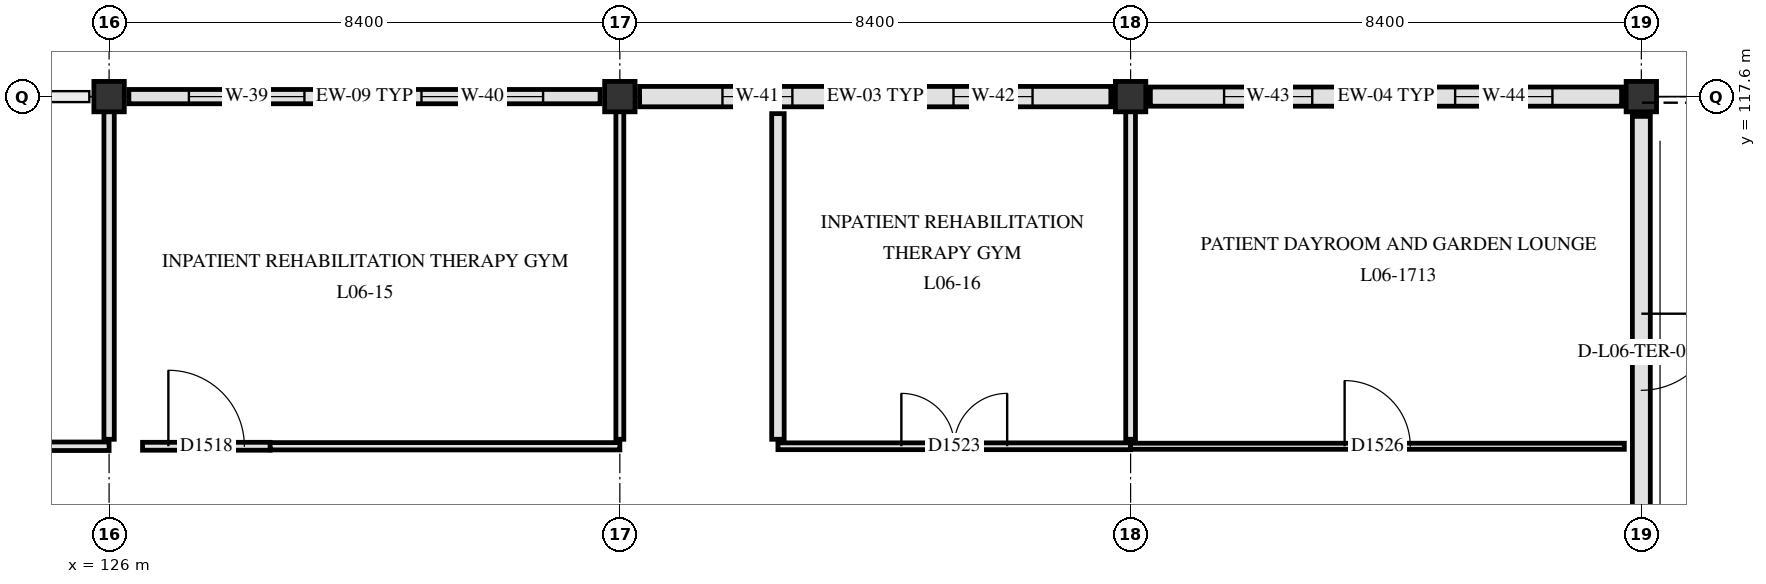
"""IFC4 building model, lengths in metres.
Left out: names, types, materials, properties, quantities, classifications, styles, units other than length and angle.
Written with IfcOpenShell. Run it as: python <this file> out.ifc"""

import sys

from ifc_helpers import new_model, si_unit, direction, frame, frame_2d, origin, origin_2d, place, context, subcontext, project, spatial, rectangle, extrude, element, fill, save


model = new_model("IFC4")
c1 = context("Model", 3, precision=1e-05, world=origin(), true_north=direction((0.0, 1.0)))
c2 = subcontext(c1, "Body", "Model", "MODEL_VIEW")
j1 = project(units=[si_unit("LENGTHUNIT", "METRE"), si_unit("PLANEANGLEUNIT", "RADIAN")], contexts=[c1])
p1 = place(None, origin())
s1 = spatial("IfcSite", under=j1, at=p1, CompositionType="ELEMENT")
p2 = place(p1, origin())
s2 = spatial("IfcBuilding", under=s1, at=p2, CompositionType="ELEMENT")
p3 = place(p2, frame((0.0, 0.0, 26.4)))
s3 = spatial("IfcBuildingStorey", under=s2, at=p3, CompositionType="ELEMENT", Elevation=26.4)
for number, where, z_axis, x_axis in (
    (1, (126.0, 117.6, 0.0), (0.0, 0.0, 1.0), (1.0, 0.0, 0.0)),
    (2, (134.4, 117.6, 0.0), (0.0, 0.0, 1.0), (1.0, 0.0, 0.0)),
    (3, (142.8, 117.6, 0.0), (0.0, 0.0, 1.0), (1.0, 0.0, 0.0)),
    (4, (151.2, 117.6, 0.0), (0.0, 0.0, 1.0), (1.0, 0.0, 0.0)),
):
    element("IfcColumn", number, at=place(p3, frame(where, z_axis=z_axis, x_axis=x_axis)), inside=s3, PredefinedType="COLUMN", context=c2, shape_type="SweptSolid", body=[
        extrude(rectangle(XDim=0.5, YDim=0.5, at=origin_2d()), origin(), (0.0, 0.0, 1.0), 3.9),
    ])
p4 = place(p3, frame((126.325, 117.6, 0.0), z_axis=(0.0, 0.0, 1.0), x_axis=(1.0, 0.0, 0.0)))
e5 = element("IfcWall", 5, at=p4, inside=s3, PredefinedType="SOLIDWALL", context=c2, shape_type="SweptSolid", body=[
    extrude(rectangle(XDim=7.75, YDim=0.235, at=frame_2d((3.875, 0.0))), origin(), (0.0, 0.0, 1.0), 3.26),
])
p5 = place(p4, frame((0.988, 0.0, 0.85)))
e6 = element("IfcOpeningElement", 6, at=p5, cuts=e5, PredefinedType="OPENING", context=c2, shape_type="SweptSolid", body=[
    extrude(rectangle(XDim=1.9, YDim=1.66, at=frame_2d((0.95, 0.83))), frame((0.0, 0.127, 0.0), z_axis=(0.0, -1.0, 0.0), x_axis=(1.0, 0.0, 0.0)), (0.0, 0.0, 1.0), 0.255),
])
p6 = place(p4, frame((4.812, 0.0, 0.85)))
e7 = element("IfcOpeningElement", 7, at=p6, cuts=e5, PredefinedType="OPENING", context=c2, shape_type="SweptSolid", body=[
    extrude(rectangle(XDim=2.0, YDim=1.66, at=frame_2d((1.0, 0.83))), frame((0.0, 0.127, 0.0), z_axis=(0.0, -1.0, 0.0), x_axis=(1.0, 0.0, 0.0)), (0.0, 0.0, 1.0), 0.255),
])
p7 = place(p3, frame((134.725, 117.6, 0.0), z_axis=(0.0, 0.0, 1.0), x_axis=(1.0, 0.0, 0.0)))
e8 = element("IfcWall", 8, at=p7, inside=s3, PredefinedType="SOLIDWALL", context=c2, shape_type="SweptSolid", body=[
    extrude(rectangle(XDim=7.75, YDim=0.335, at=frame_2d((3.875, 0.0))), origin(), (0.0, 0.0, 1.0), 3.26),
])
p8 = place(p7, frame((1.363, 0.0, 0.85)))
e9 = element("IfcOpeningElement", 9, at=p8, cuts=e8, PredefinedType="OPENING", context=c2, shape_type="SweptSolid", body=[
    extrude(rectangle(XDim=1.15, YDim=1.78, at=frame_2d((0.575, 0.89))), frame((0.0, 0.177, 0.0), z_axis=(0.0, -1.0, 0.0), x_axis=(1.0, 0.0, 0.0)), (0.0, 0.0, 1.0), 0.355),
])
p9 = place(p7, frame((5.163, 0.0, 0.85)))
e10 = element("IfcOpeningElement", 10, at=p9, cuts=e8, PredefinedType="OPENING", context=c2, shape_type="SweptSolid", body=[
    extrude(rectangle(XDim=1.3, YDim=1.78, at=frame_2d((0.65, 0.89))), frame((0.0, 0.177, 0.0), z_axis=(0.0, -1.0, 0.0), x_axis=(1.0, 0.0, 0.0)), (0.0, 0.0, 1.0), 0.355),
])
p10 = place(p3, frame((143.125, 117.6, 0.0), z_axis=(0.0, 0.0, 1.0), x_axis=(1.0, 0.0, 0.0)))
e11 = element("IfcWall", 11, at=p10, inside=s3, PredefinedType="SOLIDWALL", context=c2, shape_type="SweptSolid", body=[
    extrude(rectangle(XDim=7.75, YDim=0.315, at=frame_2d((3.875, 0.0))), origin(), (0.0, 0.0, 1.0), 3.26),
])
p11 = place(p10, frame((1.212, 0.0, 0.85)))
e12 = element("IfcOpeningElement", 12, at=p11, cuts=e11, PredefinedType="OPENING", context=c2, shape_type="SweptSolid", body=[
    extrude(rectangle(XDim=1.45, YDim=1.78, at=frame_2d((0.725, 0.89))), frame((0.0, 0.167, 0.0), z_axis=(0.0, -1.0, 0.0), x_axis=(1.0, 0.0, 0.0)), (0.0, 0.0, 1.0), 0.335),
])
p12 = place(p10, frame((5.012, 0.0, 0.85)))
e13 = element("IfcOpeningElement", 13, at=p12, cuts=e11, PredefinedType="OPENING", context=c2, shape_type="SweptSolid", body=[
    extrude(rectangle(XDim=1.6, YDim=1.78, at=frame_2d((0.8, 0.89))), frame((0.0, 0.167, 0.0), z_axis=(0.0, -1.0, 0.0), x_axis=(1.0, 0.0, 0.0)), (0.0, 0.0, 1.0), 0.335),
])
p13 = place(p3, frame((151.2, 117.275, 0.0), z_axis=(0.0, 0.0, 1.0), x_axis=(0.0, -1.0, 0.0)))
e14 = element("IfcWall", 14, at=p13, inside=s3, PredefinedType="SOLIDWALL", context=c2, shape_type="SweptSolid", body=[
    extrude(rectangle(XDim=7.75, YDim=0.295, at=frame_2d((3.875, 0.0))), origin(), (0.0, 0.0, 1.0), 3.24),
])
p14 = place(p13, frame((3.245, 0.0, 0.0)))
e15 = element("IfcOpeningElement", 15, at=p14, cuts=e14, PredefinedType="OPENING", context=c2, shape_type="SweptSolid", body=[
    extrude(rectangle(XDim=1.26, YDim=2.15, at=frame_2d((0.63, 1.075))), frame((0.0, 0.157, 0.0), z_axis=(0.0, -1.0, 0.0), x_axis=(1.0, 0.0, 0.0)), (0.0, 0.0, 1.0), 0.315),
])
p15 = place(p3, frame((121.5, 111.85, 0.0), z_axis=(0.0, 0.0, 1.0), x_axis=(1.0, 0.0, 0.0)))
e16 = element("IfcWall", 16, at=p15, inside=s3, PredefinedType="PARTITIONING", context=c2, shape_type="SweptSolid", body=[
    extrude(rectangle(XDim=4.5, YDim=0.14, at=frame_2d((2.25, 0.0))), origin(), (0.0, 0.0, 1.0), 3.11),
])
p16 = place(p15, frame((1.3, 0.0, 0.0)))
e17 = element("IfcOpeningElement", 17, at=p16, cuts=e16, PredefinedType="OPENING", context=c2, shape_type="SweptSolid", body=[
    extrude(rectangle(XDim=1.9, YDim=2.3, at=frame_2d((0.95, 1.15))), frame((0.0, 0.08, 0.0), z_axis=(0.0, -1.0, 0.0), x_axis=(1.0, 0.0, 0.0)), (0.0, 0.0, 1.0), 0.16),
])
p17 = place(p3, frame((126.55, 111.85, 0.0), z_axis=(0.0, 0.0, 1.0), x_axis=(1.0, 0.0, 0.0)))
e18 = element("IfcWall", 18, at=p17, inside=s3, PredefinedType="PARTITIONING", context=c2, shape_type="SweptSolid", body=[
    extrude(rectangle(XDim=2.1, YDim=0.13, at=frame_2d((1.05, 0.0))), origin(), (0.0, 0.0, 1.0), 3.24),
])
p18 = place(p17, frame((0.425, 0.0, 0.0)))
e19 = element("IfcOpeningElement", 19, at=p18, cuts=e18, PredefinedType="OPENING", context=c2, shape_type="SweptSolid", body=[
    extrude(rectangle(XDim=1.25, YDim=2.2, at=frame_2d((0.625, 1.1))), frame((0.0, 0.075, 0.0), z_axis=(0.0, -1.0, 0.0), x_axis=(1.0, 0.0, 0.0)), (0.0, 0.0, 1.0), 0.15),
])
p19 = place(p3, frame((128.65, 111.85, 0.0), z_axis=(0.0, 0.0, 1.0), x_axis=(1.0, 0.0, 0.0)))
e20 = element("IfcWall", 20, at=p19, inside=s3, PredefinedType="PARTITIONING", context=c2, shape_type="SweptSolid", body=[
    extrude(rectangle(XDim=5.75, YDim=0.12, at=frame_2d((2.875, 0.0))), origin(), (0.0, 0.0, 1.0), 3.11),
])
p20 = place(p3, frame((137.0, 111.85, 0.0), z_axis=(0.0, 0.0, 1.0), x_axis=(1.0, 0.0, 0.0)))
e21 = element("IfcWall", 21, at=p20, inside=s3, PredefinedType="PARTITIONING", context=c2, shape_type="SweptSolid", body=[
    extrude(rectangle(XDim=5.8, YDim=0.112, at=frame_2d((2.9, 0.0))), origin(), (0.0, 0.0, 1.0), 3.11),
])
p21 = place(p20, frame((2.03, 0.0, 0.0)))
e22 = element("IfcOpeningElement", 22, at=p21, cuts=e21, PredefinedType="OPENING", context=c2, shape_type="SweptSolid", body=[
    extrude(rectangle(XDim=1.74, YDim=2.24, at=frame_2d((0.87, 1.12))), frame((0.0, 0.066, 0.0), z_axis=(0.0, -1.0, 0.0), x_axis=(1.0, 0.0, 0.0)), (0.0, 0.0, 1.0), 0.132),
])
p22 = place(p3, frame((142.8, 111.85, 0.0), z_axis=(0.0, 0.0, 1.0), x_axis=(1.0, 0.0, 0.0)))
e23 = element("IfcWall", 23, at=p22, inside=s3, PredefinedType="PARTITIONING", context=c2, shape_type="SweptSolid", body=[
    extrude(rectangle(XDim=8.12, YDim=0.1, at=frame_2d((4.06, 0.0))), origin(), (0.0, 0.0, 1.0), 3.11),
])
p23 = place(p22, frame((3.52, 0.0, 0.0)))
e24 = element("IfcOpeningElement", 24, at=p23, cuts=e23, PredefinedType="OPENING", context=c2, shape_type="SweptSolid", body=[
    extrude(rectangle(XDim=1.08, YDim=2.12, at=frame_2d((0.54, 1.06))), frame((0.0, 0.06, 0.0), z_axis=(0.0, -1.0, 0.0), x_axis=(1.0, 0.0, 0.0)), (0.0, 0.0, 1.0), 0.12),
])
p24 = place(p3, frame((126.0, 111.965, 0.0), z_axis=(0.0, 0.0, 1.0), x_axis=(0.0, 1.0, 0.0)))
e25 = element("IfcWall", 25, at=p24, inside=s3, PredefinedType="PARTITIONING", context=c2, shape_type="SweptSolid", body=[
    extrude(rectangle(XDim=5.39, YDim=0.17, at=frame_2d((2.695, 0.0))), origin(), (0.0, 0.0, 1.0), 3.11),
])
p25 = place(p3, frame((134.4, 111.965, 0.0), z_axis=(0.0, 0.0, 1.0), x_axis=(0.0, 1.0, 0.0)))
e26 = element("IfcWall", 26, at=p25, inside=s3, PredefinedType="PARTITIONING", context=c2, shape_type="SweptSolid", body=[
    extrude(rectangle(XDim=5.39, YDim=0.13, at=frame_2d((2.695, 0.0))), origin(), (0.0, 0.0, 1.0), 3.11),
])
p26 = place(p3, frame((137.0, 111.965, 0.0), z_axis=(0.0, 0.0, 1.0), x_axis=(0.0, 1.0, 0.0)))
e27 = element("IfcWall", 27, at=p26, inside=s3, PredefinedType="PARTITIONING", context=c2, shape_type="SweptSolid", body=[
    extrude(rectangle(XDim=5.355, YDim=0.205, at=frame_2d((2.677, 0.0))), origin(), (0.0, 0.0, 1.0), 3.24),
])
p27 = place(p3, frame((142.8, 111.965, 0.0), z_axis=(0.0, 0.0, 1.0), x_axis=(0.0, 1.0, 0.0)))
e28 = element("IfcWall", 28, at=p27, inside=s3, PredefinedType="PARTITIONING", context=c2, shape_type="SweptSolid", body=[
    extrude(rectangle(XDim=5.39, YDim=0.16, at=frame_2d((2.695, 0.0))), origin(), (0.0, 0.0, 1.0), 3.11),
])
p28 = place(p5, origin())
e29 = element("IfcWindow", 29, at=p28, inside=s3, PartitioningType="SINGLE_PANEL", PredefinedType="WINDOW", context=c2, shape_type="SweptSolid", body=[
    extrude(rectangle(XDim=1.9, YDim=1.66, at=frame_2d((0.95, 0.83))), frame((0.0, 0.03, 0.0), z_axis=(0.0, -1.0, 0.0), x_axis=(1.0, 0.0, 0.0)), (0.0, 0.0, 1.0), 0.06),
])
fill(e6, e29)
p29 = place(p6, origin())
e30 = element("IfcWindow", 30, at=p29, inside=s3, PartitioningType="SINGLE_PANEL", PredefinedType="WINDOW", context=c2, shape_type="SweptSolid", body=[
    extrude(rectangle(XDim=2.0, YDim=1.66, at=frame_2d((1.0, 0.83))), frame((0.0, 0.03, 0.0), z_axis=(0.0, -1.0, 0.0), x_axis=(1.0, 0.0, 0.0)), (0.0, 0.0, 1.0), 0.06),
])
fill(e7, e30)
p30 = place(p8, origin())
e31 = element("IfcWindow", 31, at=p30, inside=s3, PartitioningType="SINGLE_PANEL", PredefinedType="WINDOW", context=c2, shape_type="SweptSolid", body=[
    extrude(rectangle(XDim=1.15, YDim=1.78, at=frame_2d((0.575, 0.89))), frame((0.0, 0.03, 0.0), z_axis=(0.0, -1.0, 0.0), x_axis=(1.0, 0.0, 0.0)), (0.0, 0.0, 1.0), 0.06),
])
fill(e9, e31)
p31 = place(p9, origin())
e32 = element("IfcWindow", 32, at=p31, inside=s3, PartitioningType="SINGLE_PANEL", PredefinedType="WINDOW", context=c2, shape_type="SweptSolid", body=[
    extrude(rectangle(XDim=1.3, YDim=1.78, at=frame_2d((0.65, 0.89))), frame((0.0, 0.03, 0.0), z_axis=(0.0, -1.0, 0.0), x_axis=(1.0, 0.0, 0.0)), (0.0, 0.0, 1.0), 0.06),
])
fill(e10, e32)
p32 = place(p11, origin())
e33 = element("IfcWindow", 33, at=p32, inside=s3, PartitioningType="SINGLE_PANEL", PredefinedType="WINDOW", context=c2, shape_type="SweptSolid", body=[
    extrude(rectangle(XDim=1.45, YDim=1.78, at=frame_2d((0.725, 0.89))), frame((0.0, 0.03, 0.0), z_axis=(0.0, -1.0, 0.0), x_axis=(1.0, 0.0, 0.0)), (0.0, 0.0, 1.0), 0.06),
])
fill(e12, e33)
p33 = place(p12, origin())
e34 = element("IfcWindow", 34, at=p33, inside=s3, PartitioningType="SINGLE_PANEL", PredefinedType="WINDOW", context=c2, shape_type="SweptSolid", body=[
    extrude(rectangle(XDim=1.6, YDim=1.78, at=frame_2d((0.8, 0.89))), frame((0.0, 0.03, 0.0), z_axis=(0.0, -1.0, 0.0), x_axis=(1.0, 0.0, 0.0)), (0.0, 0.0, 1.0), 0.06),
])
fill(e13, e34)
p34 = place(p14, origin())
e35 = element("IfcDoor", 35, at=p34, inside=s3, OperationType="SINGLE_SWING_LEFT", PredefinedType="DOOR", context=c2, shape_type="SweptSolid", body=[
    extrude(rectangle(XDim=1.26, YDim=2.15, at=frame_2d((0.63, 1.075))), frame((0.0, 0.025, 0.0), z_axis=(0.0, -1.0, 0.0), x_axis=(1.0, 0.0, 0.0)), (0.0, 0.0, 1.0), 0.05),
])
fill(e15, e35)
p35 = place(p18, origin())
e36 = element("IfcDoor", 36, at=p35, inside=s3, OperationType="SINGLE_SWING_LEFT", PredefinedType="DOOR", context=c2, shape_type="SweptSolid", body=[
    extrude(rectangle(XDim=1.25, YDim=2.2, at=frame_2d((0.625, 1.1))), frame((0.0, 0.025, 0.0), z_axis=(0.0, -1.0, 0.0), x_axis=(1.0, 0.0, 0.0)), (0.0, 0.0, 1.0), 0.05),
])
fill(e19, e36)
p36 = place(p21, origin())
e37 = element("IfcDoor", 37, at=p36, inside=s3, OperationType="DOUBLE_SWING_RIGHT", PredefinedType="DOOR", context=c2, shape_type="SweptSolid", body=[
    extrude(rectangle(XDim=1.74, YDim=2.24, at=frame_2d((0.87, 1.12))), frame((0.0, 0.025, 0.0), z_axis=(0.0, -1.0, 0.0), x_axis=(1.0, 0.0, 0.0)), (0.0, 0.0, 1.0), 0.05),
])
fill(e22, e37)
p37 = place(p23, origin())
e38 = element("IfcDoor", 38, at=p37, inside=s3, OperationType="SINGLE_SWING_LEFT", PredefinedType="DOOR", context=c2, shape_type="SweptSolid", body=[
    extrude(rectangle(XDim=1.08, YDim=2.12, at=frame_2d((0.54, 1.06))), frame((0.0, 0.025, 0.0), z_axis=(0.0, -1.0, 0.0), x_axis=(1.0, 0.0, 0.0)), (0.0, 0.0, 1.0), 0.05),
])
fill(e24, e38)
save(model, sys.argv[1])
